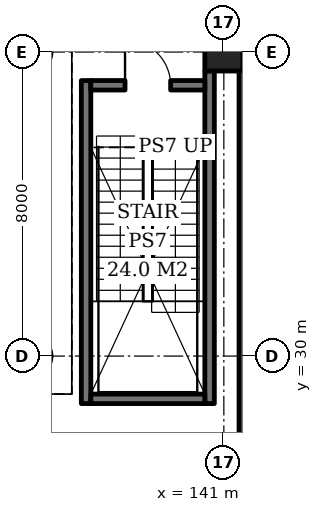
"""IFC4 building model, lengths in metres.
Left out: names, types, materials, properties, quantities, classifications, styles, units other than length and angle.
Written with IfcOpenShell. Run it as: python <this file> out.ifc"""

import sys

from ifc_helpers import new_model, si_unit, direction, frame, frame_2d, origin, origin_2d, place, context, subcontext, project, spatial, rectangle, extrude, element, fill, save


model = new_model("IFC4")
c1 = context("Model", 3, precision=1e-05, world=origin(), true_north=direction((0.0, 1.0)))
c2 = subcontext(c1, "Body", "Model", "MODEL_VIEW")
j1 = project(units=[si_unit("LENGTHUNIT", "METRE"), si_unit("PLANEANGLEUNIT", "RADIAN")], contexts=[c1])
p1 = place(None, origin())
s1 = spatial("IfcSite", under=j1, at=p1, CompositionType="ELEMENT")
p2 = place(p1, origin())
s2 = spatial("IfcBuilding", under=s1, at=p2, CompositionType="ELEMENT")
p3 = place(p2, frame((0.0, 0.0, -5.0)))
s3 = spatial("IfcBuildingStorey", under=s2, at=p3, CompositionType="ELEMENT", Elevation=-5.0)
p4 = place(p3, frame((141.0, 38.0, 0.0), z_axis=(0.0, 0.0, 1.0), x_axis=(1.0, 0.0, 0.0)))
e1 = element("IfcColumn", 1, at=p4, inside=s3, PredefinedType="COLUMN", context=c2, shape_type="SweptSolid", body=[
    extrude(rectangle(XDim=1.0, YDim=1.0, at=origin_2d()), origin(), (0.0, 0.0, 1.0), 5.0),
])
p5 = place(p3, frame((141.7, 5.6, 0.0), z_axis=(0.0, 0.0, 1.0), x_axis=(0.0, 1.0, 0.0)))
e2 = element("IfcWall", 2, at=p5, inside=s3, PredefinedType="USERDEFINED", context=c2, shape_type="SweptSolid", body=[
    extrude(rectangle(XDim=88.8, YDim=0.6, at=frame_2d((44.4, 0.0))), origin(), (0.0, 0.0, 1.0), 5.0),
])
p6 = place(p3, frame((137.375, 28.75, 0.0), z_axis=(0.0, 0.0, 1.0), x_axis=(0.0, 1.0, 0.0)))
e3 = element("IfcWall", 3, at=p6, inside=s3, PredefinedType="SOLIDWALL", context=c2, shape_type="SweptSolid", body=[
    extrude(rectangle(XDim=8.5, YDim=0.25, at=frame_2d((4.25, 0.0))), origin(), (0.0, 0.0, 1.0), 4.6),
])
p7 = place(p3, frame((140.625, 28.75, 0.0), z_axis=(0.0, 0.0, 1.0), x_axis=(0.0, 1.0, 0.0)))
e4 = element("IfcWall", 4, at=p7, inside=s3, PredefinedType="SOLIDWALL", context=c2, shape_type="SweptSolid", body=[
    extrude(rectangle(XDim=8.75, YDim=0.25, at=frame_2d((4.375, 0.0))), origin(), (0.0, 0.0, 1.0), 4.6),
])
p8 = place(p3, frame((137.5, 28.875, 0.0), z_axis=(0.0, 0.0, 1.0), x_axis=(1.0, 0.0, 0.0)))
e5 = element("IfcWall", 5, at=p8, inside=s3, PredefinedType="SOLIDWALL", context=c2, shape_type="SweptSolid", body=[
    extrude(rectangle(XDim=3.0, YDim=0.25, at=frame_2d((1.5, 0.0))), origin(), (0.0, 0.0, 1.0), 4.6),
])
p9 = place(p3, frame((137.5, 37.125, 0.0), z_axis=(0.0, 0.0, 1.0), x_axis=(1.0, 0.0, 0.0)))
e6 = element("IfcWall", 6, at=p9, inside=s3, PredefinedType="SOLIDWALL", context=c2, shape_type="SweptSolid", body=[
    extrude(rectangle(XDim=3.0, YDim=0.25, at=frame_2d((1.5, 0.0))), origin(), (0.0, 0.0, 1.0), 4.6),
])
p10 = place(p9, frame((0.9, 0.0, 0.0)))
e7 = element("IfcOpeningElement", 7, at=p10, cuts=e6, PredefinedType="OPENING", context=c2, shape_type="SweptSolid", body=[
    extrude(rectangle(XDim=1.2, YDim=2.1, at=frame_2d((0.6, 1.05))), frame((0.0, 0.135, 0.0), z_axis=(0.0, -1.0, 0.0), x_axis=(1.0, 0.0, 0.0)), (0.0, 0.0, 1.0), 0.27),
])
p11 = place(p10, origin())
e8 = element("IfcDoor", 8, at=p11, inside=s3, OperationType="SINGLE_SWING_LEFT", PredefinedType="DOOR", context=c2, shape_type="SweptSolid", body=[
    extrude(rectangle(XDim=1.2, YDim=2.1, at=frame_2d((0.6, 1.05))), frame((0.0, 0.025, 0.0), z_axis=(0.0, -1.0, 0.0), x_axis=(1.0, 0.0, 0.0)), (0.0, 0.0, 1.0), 0.05),
])
fill(e7, e8)
save(model, sys.argv[1])
